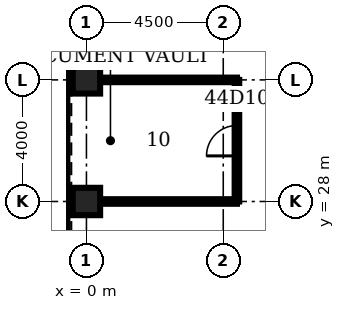
"""IFC4 building model, lengths in metres.
Left out: names, types, materials, properties, quantities, classifications, styles, units other than length and angle.
Written with IfcOpenShell. Run it as: python <this file> out.ifc"""

import sys

from ifc_helpers import new_model, si_unit, direction, frame, frame_2d, origin, origin_2d, place, context, subcontext, project, spatial, rectangle, hollow_rectangle, extrude, element, fill, save


model = new_model("IFC4")
c1 = context("Model", 3, precision=1e-05, world=origin(), true_north=direction((0.0, 1.0)))
c2 = subcontext(c1, "Body", "Model", "MODEL_VIEW")
j1 = project(units=[si_unit("LENGTHUNIT", "METRE"), si_unit("PLANEANGLEUNIT", "RADIAN")], contexts=[c1])
p1 = place(None, origin())
s1 = spatial("IfcSite", under=j1, at=p1, CompositionType="ELEMENT")
p2 = place(p1, origin())
s2 = spatial("IfcBuilding", under=s1, at=p2, CompositionType="ELEMENT")
p3 = place(p2, frame((0.0, 0.0, 198.4)))
s3 = spatial("IfcBuildingStorey", under=s2, at=p3, CompositionType="ELEMENT", Elevation=198.4)
for number, where, z_axis, x_axis in (
    (1, (0.0, 32.0, 0.0), (0.0, 0.0, 1.0), (1.0, 0.0, 0.0)),
    (2, (0.0, 28.0, 0.0), (0.0, 0.0, 1.0), (1.0, 0.0, 0.0)),
):
    element("IfcColumn", number, at=place(p3, frame(where, z_axis=z_axis, x_axis=x_axis)), inside=s3, PredefinedType="COLUMN", context=c2, shape_type="SweptSolid", body=[
        extrude(hollow_rectangle(XDim=0.9, YDim=0.9, WallThickness=0.09, at=origin_2d()), origin(), (0.0, 0.0, 1.0), 4.2),
    ])
for number, where, z_axis, x_axis in (
    (3, (0.45, 28.0, 0.0), (0.0, 0.0, 1.0), (1.0, 0.0, 0.0)),
    (4, (0.45, 32.0, 0.0), (0.0, 0.0, 1.0), (1.0, 0.0, 0.0)),
):
    element("IfcWall", number, at=place(p3, frame(where, z_axis=z_axis, x_axis=x_axis)), inside=s3, PredefinedType="PARTITIONING", context=c2, shape_type="SweptSolid", body=[
        extrude(rectangle(XDim=4.5, YDim=0.15, at=frame_2d((2.25, 0.0))), origin(), (0.0, 0.0, 1.0), 3.0),
    ])
p4 = place(p3, frame((4.95, 28.0, 0.0), z_axis=(0.0, 0.0, 1.0), x_axis=(0.0, 1.0, 0.0)))
e5 = element("IfcWall", 5, at=p4, inside=s3, PredefinedType="PARTITIONING", context=c2, shape_type="SweptSolid", body=[
    extrude(rectangle(XDim=4.0, YDim=0.15, at=frame_2d((2.0, 0.0))), origin(), (0.0, 0.0, 1.0), 3.0),
])
p5 = place(p4, frame((1.5, 0.0, 0.0)))
e6 = element("IfcOpeningElement", 6, at=p5, cuts=e5, PredefinedType="OPENING", context=c2, shape_type="SweptSolid", body=[
    extrude(rectangle(XDim=1.0, YDim=2.1, at=frame_2d((0.5, 1.05))), frame((0.0, 0.085, 0.0), z_axis=(0.0, -1.0, 0.0), x_axis=(1.0, 0.0, 0.0)), (0.0, 0.0, 1.0), 0.17),
])
p6 = place(p5, origin())
e7 = element("IfcDoor", 7, at=p6, inside=s3, OperationType="SINGLE_SWING_LEFT", PredefinedType="DOOR", context=c2, shape_type="SweptSolid", body=[
    extrude(rectangle(XDim=1.0, YDim=2.1, at=frame_2d((0.5, 1.05))), frame((0.0, 0.025, 0.0), z_axis=(0.0, -1.0, 0.0), x_axis=(1.0, 0.0, 0.0)), (0.0, 0.0, 1.0), 0.05),
])
fill(e6, e7)
save(model, sys.argv[1])
